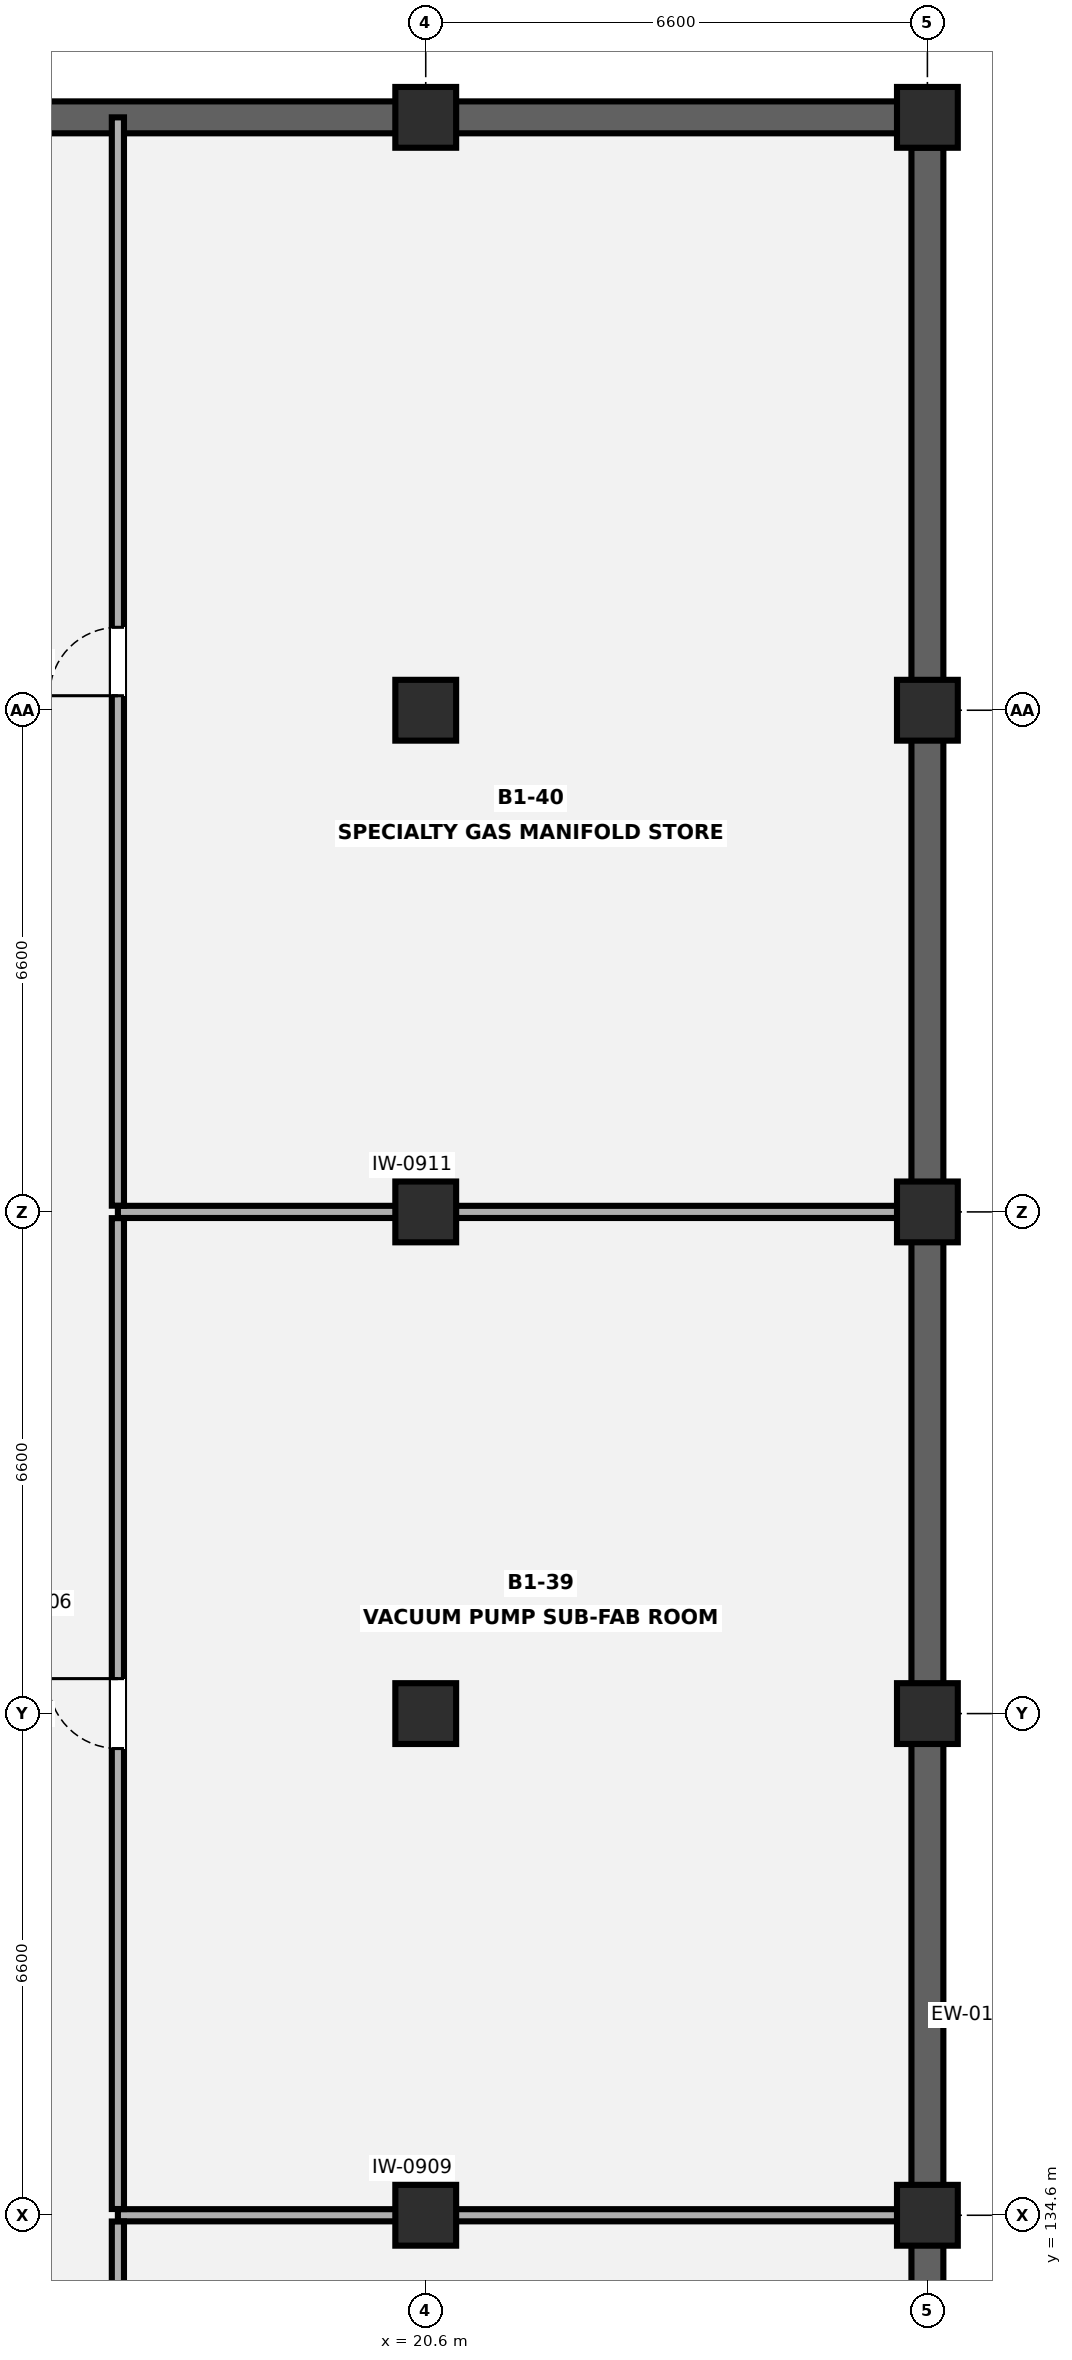
"""IFC4 building model, lengths in metres.
Left out: names, types, materials, properties, quantities, classifications, styles, units other than length and angle.
Written with IfcOpenShell. Run it as: python <this file> out.ifc"""

import sys

from ifc_helpers import new_model, si_unit, direction, frame, frame_2d, origin, origin_2d, place, context, subcontext, project, spatial, rectangle, extrude, element, fill, save


model = new_model("IFC4")
c1 = context("Model", 3, precision=1e-05, world=origin(), true_north=direction((0.0, 1.0)))
c2 = subcontext(c1, "Body", "Model", "MODEL_VIEW")
j1 = project(units=[si_unit("LENGTHUNIT", "METRE"), si_unit("PLANEANGLEUNIT", "RADIAN")], contexts=[c1])
p1 = place(None, origin())
s1 = spatial("IfcSite", under=j1, at=p1, CompositionType="ELEMENT")
p2 = place(p1, origin())
s2 = spatial("IfcBuilding", under=s1, at=p2, CompositionType="ELEMENT")
p3 = place(p2, frame((0.0, 0.0, -4.2)))
s3 = spatial("IfcBuildingStorey", under=s2, at=p3, CompositionType="ELEMENT", Elevation=-4.2)
for number, where, z_axis, x_axis in (
    (1, (20.6, 134.6, 0.0), (0.0, 0.0, 1.0), (1.0, 0.0, 0.0)),
    (2, (20.6, 141.2, 0.0), (0.0, 0.0, 1.0), (1.0, 0.0, 0.0)),
    (3, (20.6, 147.8, 0.0), (0.0, 0.0, 1.0), (1.0, 0.0, 0.0)),
    (4, (20.6, 154.4, 0.0), (0.0, 0.0, 1.0), (1.0, 0.0, 0.0)),
    (5, (20.6, 162.2, 0.0), (0.0, 0.0, 1.0), (1.0, 0.0, 0.0)),
    (6, (27.2, 134.6, 0.0), (0.0, 0.0, 1.0), (1.0, 0.0, 0.0)),
    (7, (27.2, 141.2, 0.0), (0.0, 0.0, 1.0), (1.0, 0.0, 0.0)),
    (8, (27.2, 147.8, 0.0), (0.0, 0.0, 1.0), (1.0, 0.0, 0.0)),
    (9, (27.2, 154.4, 0.0), (0.0, 0.0, 1.0), (1.0, 0.0, 0.0)),
    (10, (27.2, 162.2, 0.0), (0.0, 0.0, 1.0), (1.0, 0.0, 0.0)),
):
    element("IfcColumn", number, at=place(p3, frame(where, z_axis=z_axis, x_axis=x_axis)), inside=s3, PredefinedType="COLUMN", context=c2, shape_type="SweptSolid", body=[
        extrude(rectangle(XDim=0.8, YDim=0.8, at=origin_2d()), origin(), (0.0, 0.0, 1.0), 4.2),
    ])
p4 = place(p3, frame((7.798, 162.2, 0.0), z_axis=(0.0, 0.0, 1.0), x_axis=(1.0, 0.0, 0.0)))
e11 = element("IfcWall", 11, at=p4, inside=s3, PredefinedType="USERDEFINED", context=c2, shape_type="SweptSolid", body=[
    extrude(rectangle(XDim=19.004, YDim=0.42, at=frame_2d((9.502, 0.0))), origin(), (0.0, 0.0, 1.0), 3.85),
])
p5 = place(p3, frame((27.2, 161.802, 0.0), z_axis=(0.0, 0.0, 1.0), x_axis=(0.0, -1.0, 0.0)))
e12 = element("IfcWall", 12, at=p5, inside=s3, PredefinedType="USERDEFINED", context=c2, shape_type="SweptSolid", body=[
    extrude(rectangle(XDim=66.404, YDim=0.42, at=frame_2d((33.202, 0.0))), origin(), (0.0, 0.0, 1.0), 3.85),
])
p6 = place(p3, frame((16.55, 134.6, 0.0), z_axis=(0.0, 0.0, 1.0), x_axis=(1.0, 0.0, 0.0)))
e13 = element("IfcWall", 13, at=p6, inside=s3, PredefinedType="PARTITIONING", context=c2, shape_type="SweptSolid", body=[
    extrude(rectangle(XDim=10.458, YDim=0.16, at=frame_2d((5.229, 0.0))), origin(), (0.0, 0.0, 1.0), 2.435),
])
p7 = place(p3, frame((16.55, 121.477, 0.0), z_axis=(0.0, 0.0, 1.0), x_axis=(0.0, 1.0, 0.0)))
e14 = element("IfcWall", 14, at=p7, inside=s3, PredefinedType="PARTITIONING", context=c2, shape_type="SweptSolid", body=[
    extrude(rectangle(XDim=13.041, YDim=0.16, at=frame_2d((6.521, 0.0))), origin(), (0.0, 0.0, 1.0), 3.85),
])
p8 = place(p7, frame((6.071, 0.0, 0.0)))
e15 = element("IfcOpeningElement", 15, at=p8, cuts=e14, PredefinedType="OPENING", context=c2, shape_type="SweptSolid", body=[
    extrude(rectangle(XDim=0.9, YDim=2.1, at=frame_2d((0.45, 1.05))), frame((0.0, 0.09, 0.0), z_axis=(0.0, -1.0, 0.0), x_axis=(1.0, 0.0, 0.0)), (0.0, 0.0, 1.0), 0.18),
])
p9 = place(p3, frame((16.55, 147.8, 0.0), z_axis=(0.0, 0.0, 1.0), x_axis=(1.0, 0.0, 0.0)))
e16 = element("IfcWall", 16, at=p9, inside=s3, PredefinedType="PARTITIONING", context=c2, shape_type="SweptSolid", body=[
    extrude(rectangle(XDim=10.458, YDim=0.16, at=frame_2d((5.229, 0.0))), origin(), (0.0, 0.0, 1.0), 2.435),
])
p10 = place(p3, frame((16.55, 134.682, 0.0), z_axis=(0.0, 0.0, 1.0), x_axis=(0.0, 1.0, 0.0)))
e17 = element("IfcWall", 17, at=p10, inside=s3, PredefinedType="PARTITIONING", context=c2, shape_type="SweptSolid", body=[
    extrude(rectangle(XDim=13.036, YDim=0.16, at=frame_2d((6.518, 0.0))), origin(), (0.0, 0.0, 1.0), 3.85),
])
p11 = place(p10, frame((6.058, 0.0, 0.0)))
e18 = element("IfcOpeningElement", 18, at=p11, cuts=e17, PredefinedType="OPENING", context=c2, shape_type="SweptSolid", body=[
    extrude(rectangle(XDim=0.92, YDim=2.12, at=frame_2d((0.46, 1.06))), frame((0.0, 0.09, 0.0), z_axis=(0.0, -1.0, 0.0), x_axis=(1.0, 0.0, 0.0)), (0.0, 0.0, 1.0), 0.18),
])
p12 = place(p3, frame((16.55, 147.882, 0.0), z_axis=(0.0, 0.0, 1.0), x_axis=(0.0, 1.0, 0.0)))
e19 = element("IfcWall", 19, at=p12, inside=s3, PredefinedType="PARTITIONING", context=c2, shape_type="SweptSolid", body=[
    extrude(rectangle(XDim=14.318, YDim=0.16, at=frame_2d((7.159, 0.0))), origin(), (0.0, 0.0, 1.0), 3.85),
])
p13 = place(p12, frame((6.709, 0.0, 0.0)))
e20 = element("IfcOpeningElement", 20, at=p13, cuts=e19, PredefinedType="OPENING", context=c2, shape_type="SweptSolid", body=[
    extrude(rectangle(XDim=0.9, YDim=2.1, at=frame_2d((0.45, 1.05))), frame((0.0, 0.09, 0.0), z_axis=(0.0, -1.0, 0.0), x_axis=(1.0, 0.0, 0.0)), (0.0, 0.0, 1.0), 0.18),
])
p14 = place(p11, origin())
e21 = element("IfcDoor", 21, at=p14, inside=s3, OperationType="SINGLE_SWING_RIGHT", PredefinedType="DOOR", context=c2, shape_type="SweptSolid", body=[
    extrude(rectangle(XDim=0.92, YDim=2.12, at=frame_2d((0.46, 1.06))), frame((0.0, 0.025, 0.0), z_axis=(0.0, -1.0, 0.0), x_axis=(1.0, 0.0, 0.0)), (0.0, 0.0, 1.0), 0.05),
])
fill(e18, e21)
p15 = place(p13, origin())
e22 = element("IfcDoor", 22, at=p15, inside=s3, OperationType="SINGLE_SWING_LEFT", PredefinedType="DOOR", context=c2, shape_type="SweptSolid", body=[
    extrude(rectangle(XDim=0.9, YDim=2.1, at=frame_2d((0.45, 1.05))), frame((0.0, 0.025, 0.0), z_axis=(0.0, -1.0, 0.0), x_axis=(1.0, 0.0, 0.0)), (0.0, 0.0, 1.0), 0.05),
])
fill(e20, e22)
save(model, sys.argv[1])
